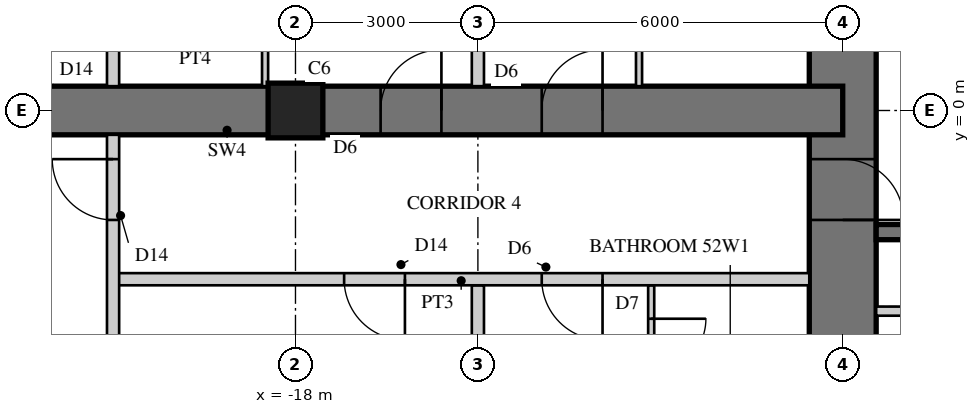
"""IFC4 building model, lengths in metres.
Left out: names, types, materials, properties, quantities, classifications, styles, units other than length and angle.
Written with IfcOpenShell. Run it as: python <this file> out.ifc"""

import sys

from ifc_helpers import new_model, si_unit, direction, frame, frame_2d, origin, origin_2d, place, context, subcontext, project, spatial, rectangle, extrude, element, fill, save


model = new_model("IFC4")
c1 = context("Model", 3, precision=1e-05, world=origin(), true_north=direction((0.0, 1.0)))
c2 = subcontext(c1, "Body", "Model", "MODEL_VIEW")
j1 = project(units=[si_unit("LENGTHUNIT", "METRE"), si_unit("PLANEANGLEUNIT", "RADIAN")], contexts=[c1])
p1 = place(None, origin())
s1 = spatial("IfcSite", under=j1, at=p1, CompositionType="ELEMENT")
p2 = place(p1, origin())
s2 = spatial("IfcBuilding", under=s1, at=p2, CompositionType="ELEMENT")
p3 = place(p2, frame((0.0, 0.0, 206.9)))
s3 = spatial("IfcBuildingStorey", under=s2, at=p3, CompositionType="ELEMENT", Elevation=206.9)
p4 = place(p3, frame((-9.0, 9.0, 0.0), z_axis=(0.0, 0.0, 1.0), x_axis=(0.0, -1.0, 0.0)))
e1 = element("IfcWall", 1, at=p4, inside=s3, PredefinedType="SHEAR", context=c2, shape_type="SweptSolid", body=[
    extrude(rectangle(XDim=18.0, YDim=1.1, at=frame_2d((9.0, 0.0))), origin(), (0.0, 0.0, 1.0), 3.4),
])
p5 = place(p4, frame((9.8, 0.0, 0.0)))
e2 = element("IfcOpeningElement", 2, at=p5, cuts=e1, PredefinedType="OPENING", context=c2, shape_type="SweptSolid", body=[
    extrude(rectangle(XDim=1.0, YDim=2.4, at=frame_2d((0.5, 1.2))), frame((0.0, 0.56, 0.0), z_axis=(0.0, -1.0, 0.0), x_axis=(1.0, 0.0, 0.0)), (0.0, 0.0, 1.0), 1.12),
])
p6 = place(p3, frame((-1.925, -2.0, 0.0), z_axis=(0.0, 0.0, 1.0), x_axis=(-1.0, 0.0, 0.0)))
e3 = element("IfcWall", 3, at=p6, inside=s3, PredefinedType="SHEAR", context=c2, shape_type="SweptSolid", body=[
    extrude(rectangle(XDim=6.525, YDim=0.25, at=frame_2d((3.262, 0.0))), origin(), (0.0, 0.0, 1.0), 3.4),
])
p7 = place(p3, frame((-1.925, -3.3, 0.0), z_axis=(0.0, 0.0, 1.0), x_axis=(-1.0, 0.0, 0.0)))
e4 = element("IfcWall", 4, at=p7, inside=s3, PredefinedType="PARTITIONING", context=c2, shape_type="SweptSolid", body=[
    extrude(rectangle(XDim=6.525, YDim=0.15, at=frame_2d((3.262, 0.0))), origin(), (0.0, 0.0, 1.0), 3.4),
])
p8 = place(p7, frame((0.075, 0.0, 0.0)))
e5 = element("IfcOpeningElement", 5, at=p8, cuts=e4, PredefinedType="OPENING", context=c2, shape_type="SweptSolid", body=[
    extrude(rectangle(XDim=0.8, YDim=2.1, at=frame_2d((0.4, 1.05))), frame((0.0, 0.085, 0.0), z_axis=(0.0, -1.0, 0.0), x_axis=(1.0, 0.0, 0.0)), (0.0, 0.0, 1.0), 0.17),
])
p9 = place(p7, frame((3.675, 0.0, 0.0)))
e6 = element("IfcOpeningElement", 6, at=p9, cuts=e4, PredefinedType="OPENING", context=c2, shape_type="SweptSolid", body=[
    extrude(rectangle(XDim=0.8, YDim=2.1, at=frame_2d((0.4, 1.05))), frame((0.0, 0.085, 0.0), z_axis=(0.0, -1.0, 0.0), x_axis=(1.0, 0.0, 0.0)), (0.0, 0.0, 1.0), 0.17),
])
p10 = place(p3, frame((-9.0, 0.0, 0.0), z_axis=(0.0, 0.0, 1.0), x_axis=(-1.0, 0.0, 0.0)))
e7 = element("IfcWall", 7, at=p10, inside=s3, PredefinedType="SHEAR", context=c2, shape_type="SweptSolid", body=[
    extrude(rectangle(XDim=18.0, YDim=0.8, at=frame_2d((9.0, 0.0))), origin(), (0.0, 0.0, 1.0), 3.4),
])
p11 = place(p10, frame((3.95, 0.0, 0.0)))
e8 = element("IfcOpeningElement", 8, at=p11, cuts=e7, PredefinedType="OPENING", context=c2, shape_type="SweptSolid", body=[
    extrude(rectangle(XDim=1.0, YDim=2.15, at=frame_2d((0.5, 1.075))), frame((0.0, 0.41, 0.0), z_axis=(0.0, -1.0, 0.0), x_axis=(1.0, 0.0, 0.0)), (0.0, 0.0, 1.0), 0.82),
])
p12 = place(p10, frame((6.6, 0.0, 0.0)))
e9 = element("IfcOpeningElement", 9, at=p12, cuts=e7, PredefinedType="OPENING", context=c2, shape_type="SweptSolid", body=[
    extrude(rectangle(XDim=1.0, YDim=2.15, at=frame_2d((0.5, 1.075))), frame((0.0, 0.41, 0.0), z_axis=(0.0, -1.0, 0.0), x_axis=(1.0, 0.0, 0.0)), (0.0, 0.0, 1.0), 0.82),
])
p13 = place(p10, frame((13.25, 0.0, 0.0)))
e10 = element("IfcOpeningElement", 10, at=p13, cuts=e7, PredefinedType="OPENING", context=c2, shape_type="SweptSolid", body=[
    extrude(rectangle(XDim=1.0, YDim=2.2, at=frame_2d((0.5, 1.1))), frame((0.0, 0.41, 0.0), z_axis=(0.0, -1.0, 0.0), x_axis=(1.0, 0.0, 0.0)), (0.0, 0.0, 1.0), 0.82),
])
p14 = place(p3, frame((-18.0, 0.0, 0.0), z_axis=(0.0, 0.0, 1.0), x_axis=(1.0, 0.0, 0.0)))
e11 = element("IfcColumn", 11, at=p14, inside=s3, PredefinedType="COLUMN", context=c2, shape_type="SweptSolid", body=[
    extrude(rectangle(XDim=0.9, YDim=0.9, at=origin_2d()), origin(), (0.0, 0.0, 1.0), 3.4),
])
p15 = place(p3, frame((-12.15, -2.875, 0.0), z_axis=(0.0, 0.0, 1.0), x_axis=(0.0, -1.0, 0.0)))
e12 = element("IfcWall", 12, at=p15, inside=s3, PredefinedType="PARTITIONING", context=c2, shape_type="SweptSolid", body=[
    extrude(rectangle(XDim=2.2, YDim=0.1, at=frame_2d((1.1, 0.0))), origin(), (0.0, 0.0, 1.0), 3.22),
])
p16 = place(p15, frame((0.55, 0.0, 0.0)))
e13 = element("IfcOpeningElement", 13, at=p16, cuts=e12, PredefinedType="OPENING", context=c2, shape_type="SweptSolid", body=[
    extrude(rectangle(XDim=0.9, YDim=2.1, at=frame_2d((0.45, 1.05))), frame((0.0, 0.06, 0.0), z_axis=(0.0, -1.0, 0.0), x_axis=(1.0, 0.0, 0.0)), (0.0, 0.0, 1.0), 0.12),
])
p17 = place(p3, frame((-12.35, 3.0, 0.0), z_axis=(0.0, 0.0, 1.0), x_axis=(0.0, -1.0, 0.0)))
e14 = element("IfcWall", 14, at=p17, inside=s3, PredefinedType="PARTITIONING", context=c2, shape_type="SweptSolid", body=[
    extrude(rectangle(XDim=2.6, YDim=0.1, at=frame_2d((1.3, 0.0))), origin(), (0.0, 0.0, 1.0), 3.22),
])
p18 = place(p17, frame((0.55, 0.0, 0.0)))
e15 = element("IfcOpeningElement", 15, at=p18, cuts=e14, PredefinedType="OPENING", context=c2, shape_type="SweptSolid", body=[
    extrude(rectangle(XDim=0.9, YDim=2.1, at=frame_2d((0.45, 1.05))), frame((0.0, 0.06, 0.0), z_axis=(0.0, -1.0, 0.0), x_axis=(1.0, 0.0, 0.0)), (0.0, 0.0, 1.0), 0.12),
])
p19 = place(p3, frame((-15.0, -2.875, 0.0), z_axis=(0.0, 0.0, 1.0), x_axis=(0.0, -1.0, 0.0)))
e16 = element("IfcWall", 16, at=p19, inside=s3, PredefinedType="SOLIDWALL", context=c2, shape_type="SweptSolid", body=[
    extrude(rectangle(XDim=5.675, YDim=0.2, at=frame_2d((2.837, 0.0))), origin(), (0.0, 0.0, 1.0), 2.47),
])
p20 = place(p3, frame((-15.0, 8.55, 0.0), z_axis=(0.0, 0.0, 1.0), x_axis=(0.0, -1.0, 0.0)))
e17 = element("IfcWall", 17, at=p20, inside=s3, PredefinedType="SOLIDWALL", context=c2, shape_type="SweptSolid", body=[
    extrude(rectangle(XDim=8.15, YDim=0.2, at=frame_2d((4.075, 0.0))), origin(), (0.0, 0.0, 1.0), 2.47),
])
p21 = place(p3, frame((-18.5, 2.6, 0.0), z_axis=(0.0, 0.0, 1.0), x_axis=(0.0, -1.0, 0.0)))
e18 = element("IfcWall", 18, at=p21, inside=s3, PredefinedType="PARTITIONING", context=c2, shape_type="SweptSolid", body=[
    extrude(rectangle(XDim=2.2, YDim=0.1, at=frame_2d((1.1, 0.0))), origin(), (0.0, 0.0, 1.0), 3.22),
])
p22 = place(p21, frame((0.55, 0.0, 0.0)))
e19 = element("IfcOpeningElement", 19, at=p22, cuts=e18, PredefinedType="OPENING", context=c2, shape_type="SweptSolid", body=[
    extrude(rectangle(XDim=0.9, YDim=2.1, at=frame_2d((0.45, 1.05))), frame((0.0, 0.06, 0.0), z_axis=(0.0, -1.0, 0.0), x_axis=(1.0, 0.0, 0.0)), (0.0, 0.0, 1.0), 0.12),
])
p23 = place(p3, frame((-9.55, -2.775, 0.0), z_axis=(0.0, 0.0, 1.0), x_axis=(-1.0, 0.0, 0.0)))
e20 = element("IfcWall", 20, at=p23, inside=s3, PredefinedType="SOLIDWALL", context=c2, shape_type="SweptSolid", body=[
    extrude(rectangle(XDim=11.45, YDim=0.2, at=frame_2d((5.725, 0.0))), origin(), (0.0, 0.0, 1.0), 3.22),
])
p24 = place(p23, frame((3.4, 0.0, 0.0)))
e21 = element("IfcOpeningElement", 21, at=p24, cuts=e20, PredefinedType="OPENING", context=c2, shape_type="SweptSolid", body=[
    extrude(rectangle(XDim=1.0, YDim=2.15, at=frame_2d((0.5, 1.075))), frame((0.0, 0.11, 0.0), z_axis=(0.0, -1.0, 0.0), x_axis=(1.0, 0.0, 0.0)), (0.0, 0.0, 1.0), 0.22),
])
p25 = place(p23, frame((6.65, 0.0, 0.0)))
e22 = element("IfcOpeningElement", 22, at=p25, cuts=e20, PredefinedType="OPENING", context=c2, shape_type="SweptSolid", body=[
    extrude(rectangle(XDim=1.0, YDim=2.2, at=frame_2d((0.5, 1.1))), frame((0.0, 0.11, 0.0), z_axis=(0.0, -1.0, 0.0), x_axis=(1.0, 0.0, 0.0)), (0.0, 0.0, 1.0), 0.22),
])
p26 = place(p3, frame((-21.0, 9.0, 0.0), z_axis=(0.0, 0.0, 1.0), x_axis=(0.0, -1.0, 0.0)))
e23 = element("IfcWall", 23, at=p26, inside=s3, PredefinedType="SOLIDWALL", context=c2, shape_type="SweptSolid", body=[
    extrude(rectangle(XDim=8.6, YDim=0.2, at=frame_2d((4.3, 0.0))), origin(), (0.0, 0.0, 1.0), 2.62),
])
p27 = place(p3, frame((-21.0, -0.4, 0.0), z_axis=(0.0, 0.0, 1.0), x_axis=(0.0, -1.0, 0.0)))
e24 = element("IfcWall", 24, at=p27, inside=s3, PredefinedType="SOLIDWALL", context=c2, shape_type="SweptSolid", body=[
    extrude(rectangle(XDim=8.6, YDim=0.2, at=frame_2d((4.3, 0.0))), origin(), (0.0, 0.0, 1.0), 2.62),
])
p28 = place(p27, frame((0.4, 0.0, 0.0)))
e25 = element("IfcOpeningElement", 25, at=p28, cuts=e24, PredefinedType="OPENING", context=c2, shape_type="SweptSolid", body=[
    extrude(rectangle(XDim=1.0, YDim=2.2, at=frame_2d((0.5, 1.1))), frame((0.0, 0.11, 0.0), z_axis=(0.0, -1.0, 0.0), x_axis=(1.0, 0.0, 0.0)), (0.0, 0.0, 1.0), 0.22),
])
p29 = place(p16, origin())
e26 = element("IfcDoor", 26, at=p29, inside=s3, OperationType="SINGLE_SWING_LEFT", PredefinedType="DOOR", context=c2, shape_type="SweptSolid", body=[
    extrude(rectangle(XDim=0.9, YDim=2.1, at=frame_2d((0.45, 1.05))), frame((0.0, 0.025, 0.0), z_axis=(0.0, -1.0, 0.0), x_axis=(1.0, 0.0, 0.0)), (0.0, 0.0, 1.0), 0.05),
])
fill(e13, e26)
p30 = place(p24, origin())
e27 = element("IfcDoor", 27, at=p30, inside=s3, OperationType="SINGLE_SWING_LEFT", PredefinedType="DOOR", context=c2, shape_type="SweptSolid", body=[
    extrude(rectangle(XDim=1.0, YDim=2.15, at=frame_2d((0.5, 1.075))), frame((0.0, 0.025, 0.0), z_axis=(0.0, -1.0, 0.0), x_axis=(1.0, 0.0, 0.0)), (0.0, 0.0, 1.0), 0.05),
])
fill(e21, e27)
p31 = place(p25, origin())
e28 = element("IfcDoor", 28, at=p31, inside=s3, OperationType="SINGLE_SWING_LEFT", PredefinedType="DOOR", context=c2, shape_type="SweptSolid", body=[
    extrude(rectangle(XDim=1.0, YDim=2.2, at=frame_2d((0.5, 1.1))), frame((0.0, 0.025, 0.0), z_axis=(0.0, -1.0, 0.0), x_axis=(1.0, 0.0, 0.0)), (0.0, 0.0, 1.0), 0.05),
])
fill(e22, e28)
p32 = place(p28, frame((1.0, 0.0, 0.0), z_axis=(0.0, 0.0, 1.0), x_axis=(-1.0, 0.0, 0.0)))
e29 = element("IfcDoor", 29, at=p32, inside=s3, OperationType="SINGLE_SWING_RIGHT", PredefinedType="DOOR", context=c2, shape_type="SweptSolid", body=[
    extrude(rectangle(XDim=1.0, YDim=2.2, at=frame_2d((0.5, 1.1))), frame((0.0, 0.025, 0.0), z_axis=(0.0, -1.0, 0.0), x_axis=(1.0, 0.0, 0.0)), (0.0, 0.0, 1.0), 0.05),
])
fill(e25, e29)
p33 = place(p11, frame((1.0, 0.0, 0.0), z_axis=(0.0, 0.0, 1.0), x_axis=(-1.0, 0.0, 0.0)))
e30 = element("IfcDoor", 30, at=p33, inside=s3, OperationType="SINGLE_SWING_RIGHT", PredefinedType="DOOR", context=c2, shape_type="SweptSolid", body=[
    extrude(rectangle(XDim=1.0, YDim=2.15, at=frame_2d((0.5, 1.075))), frame((0.0, 0.025, 0.0), z_axis=(0.0, -1.0, 0.0), x_axis=(1.0, 0.0, 0.0)), (0.0, 0.0, 1.0), 0.05),
])
fill(e8, e30)
p34 = place(p12, frame((1.0, 0.0, 0.0), z_axis=(0.0, 0.0, 1.0), x_axis=(-1.0, 0.0, 0.0)))
e31 = element("IfcDoor", 31, at=p34, inside=s3, OperationType="SINGLE_SWING_RIGHT", PredefinedType="DOOR", context=c2, shape_type="SweptSolid", body=[
    extrude(rectangle(XDim=1.0, YDim=2.15, at=frame_2d((0.5, 1.075))), frame((0.0, 0.025, 0.0), z_axis=(0.0, -1.0, 0.0), x_axis=(1.0, 0.0, 0.0)), (0.0, 0.0, 1.0), 0.05),
])
fill(e9, e31)
p35 = place(p5, origin())
e32 = element("IfcDoor", 32, at=p35, inside=s3, OperationType="SINGLE_SWING_RIGHT", PredefinedType="DOOR", context=c2, shape_type="SweptSolid", body=[
    extrude(rectangle(XDim=1.0, YDim=2.4, at=frame_2d((0.5, 1.2))), frame((0.0, 0.055, 0.0), z_axis=(0.0, -1.0, 0.0), x_axis=(1.0, 0.0, 0.0)), (0.0, 0.0, 1.0), 0.05),
])
fill(e2, e32)
save(model, sys.argv[1])
